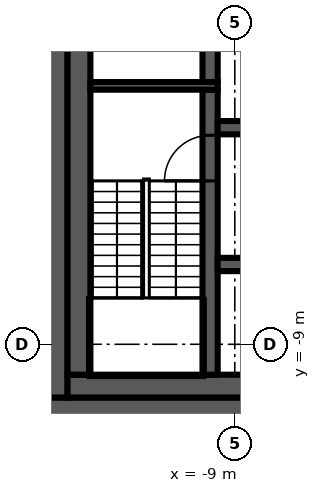
"""IFC4 building model, lengths in metres.
Left out: names, types, materials, properties, quantities, classifications, styles, units other than length and angle.
Written with IfcOpenShell. Run it as: python <this file> out.ifc"""

import sys

from ifc_helpers import new_model, si_unit, direction, frame, frame_2d, origin, place, context, subcontext, project, spatial, rectangle, extrude, element, fill, save


model = new_model("IFC4")
c1 = context("Model", 3, precision=1e-05, world=origin(), true_north=direction((0.0, 1.0)))
c2 = subcontext(c1, "Body", "Model", "MODEL_VIEW")
j1 = project(units=[si_unit("LENGTHUNIT", "METRE"), si_unit("PLANEANGLEUNIT", "RADIAN")], contexts=[c1])
p1 = place(None, origin())
s1 = spatial("IfcSite", under=j1, at=p1, CompositionType="ELEMENT")
p2 = place(p1, origin())
s2 = spatial("IfcBuilding", under=s1, at=p2, CompositionType="ELEMENT")
p3 = place(p2, frame((0.0, 0.0, 332.0)))
s3 = spatial("IfcBuildingStorey", under=s2, at=p3, CompositionType="ELEMENT", Elevation=332.0)
p4 = place(p3, frame((14.0, -10.7, 0.0), z_axis=(0.0, 0.0, 1.0), x_axis=(-1.0, 0.0, 0.0)))
e1 = element("IfcWall", 1, at=p4, inside=s3, PredefinedType="SHEAR", context=c2, shape_type="SweptSolid", body=[
    extrude(rectangle(XDim=28.0, YDim=0.6, at=frame_2d((14.0, 0.0))), origin(), (0.0, 0.0, 1.0), 3.82),
])
p5 = place(p4, frame((5.1, 0.0, 0.0)))
e2 = element("IfcOpeningElement", 2, at=p5, cuts=e1, PredefinedType="OPENING", context=c2, shape_type="SweptSolid", body=[
    extrude(rectangle(XDim=1.6, YDim=2.1, at=frame_2d((0.8, 1.05))), frame((0.0, 0.31, 0.0), z_axis=(0.0, -1.0, 0.0), x_axis=(1.0, 0.0, 0.0)), (0.0, 0.0, 1.0), 0.62),
])
p6 = place(p3, frame((-13.7, -10.4, 0.0), z_axis=(0.0, 0.0, 1.0), x_axis=(0.0, 1.0, 0.0)))
e3 = element("IfcWall", 3, at=p6, inside=s3, PredefinedType="SHEAR", context=c2, shape_type="SweptSolid", body=[
    extrude(rectangle(XDim=20.8, YDim=0.6, at=frame_2d((10.4, 0.0))), origin(), (0.0, 0.0, 1.0), 3.82),
])
p7 = place(p3, frame((6.9, -10.1, 0.0), z_axis=(0.0, 0.0, 1.0), x_axis=(-1.0, 0.0, 0.0)))
e4 = element("IfcWall", 4, at=p7, inside=s3, PredefinedType="SHEAR", context=c2, shape_type="SweptSolid", body=[
    extrude(rectangle(XDim=20.3, YDim=0.6, at=frame_2d((10.15, 0.0))), origin(), (0.0, 0.0, 1.0), 3.82),
])
p8 = place(p3, frame((-13.1, -9.8, 0.0), z_axis=(0.0, 0.0, 1.0), x_axis=(0.0, 1.0, 0.0)))
e5 = element("IfcWall", 5, at=p8, inside=s3, PredefinedType="SHEAR", context=c2, shape_type="SweptSolid", body=[
    extrude(rectangle(XDim=19.6, YDim=0.6, at=frame_2d((9.8, 0.0))), origin(), (0.0, 0.0, 1.0), 3.82),
])
p9 = place(p3, frame((-9.65, -9.8, 0.0), z_axis=(0.0, 0.0, 1.0), x_axis=(0.0, 1.0, 0.0)))
e6 = element("IfcWall", 6, at=p9, inside=s3, PredefinedType="SHEAR", context=c2, shape_type="SweptSolid", body=[
    extrude(rectangle(XDim=7.5, YDim=0.4, at=frame_2d((3.75, 0.0))), origin(), (0.0, 0.0, 1.0), 3.82),
])
p10 = place(p9, frame((5.1, 0.0, 0.0)))
e7 = element("IfcOpeningElement", 7, at=p10, cuts=e6, PredefinedType="OPENING", context=c2, shape_type="SweptSolid", body=[
    extrude(rectangle(XDim=1.2, YDim=2.1, at=frame_2d((0.6, 1.05))), frame((0.0, 0.21, 0.0), z_axis=(0.0, -1.0, 0.0), x_axis=(1.0, 0.0, 0.0)), (0.0, 0.0, 1.0), 0.42),
])
p11 = place(p3, frame((-9.65, -2.1, 0.0), z_axis=(0.0, 0.0, 1.0), x_axis=(0.0, 1.0, 0.0)))
e8 = element("IfcWall", 8, at=p11, inside=s3, PredefinedType="SHEAR", context=c2, shape_type="SweptSolid", body=[
    extrude(rectangle(XDim=4.2, YDim=0.4, at=frame_2d((2.1, 0.0))), origin(), (0.0, 0.0, 1.0), 3.82),
])
p12 = place(p3, frame((-9.45, -2.2, 0.0), z_axis=(0.0, 0.0, 1.0), x_axis=(-1.0, 0.0, 0.0)))
e9 = element("IfcWall", 9, at=p12, inside=s3, PredefinedType="SHEAR", context=c2, shape_type="SweptSolid", body=[
    extrude(rectangle(XDim=3.35, YDim=0.2, at=frame_2d((1.675, 0.0))), origin(), (0.0, 0.0, 1.0), 3.82),
])
p13 = place(p3, frame((-9.45, -3.3, 0.0), z_axis=(0.0, 0.0, 1.0), x_axis=(1.0, 0.0, 0.0)))
e10 = element("IfcWall", 10, at=p13, inside=s3, PredefinedType="SHEAR", context=c2, shape_type="SweptSolid", body=[
    extrude(rectangle(XDim=18.9, YDim=0.35, at=frame_2d((9.45, 0.0))), origin(), (0.0, 0.0, 1.0), 3.82),
])
p14 = place(p13, frame((17.0, 0.0, 0.0)))
e11 = element("IfcOpeningElement", 11, at=p14, cuts=e10, PredefinedType="OPENING", context=c2, shape_type="SweptSolid", body=[
    extrude(rectangle(XDim=1.1, YDim=2.1, at=frame_2d((0.55, 1.05))), frame((0.0, 0.185, 0.0), z_axis=(0.0, -1.0, 0.0), x_axis=(1.0, 0.0, 0.0)), (0.0, 0.0, 1.0), 0.37),
])
p15 = place(p13, frame((0.9, 0.0, 0.0)))
e12 = element("IfcOpeningElement", 12, at=p15, cuts=e10, PredefinedType="OPENING", context=c2, shape_type="SweptSolid", body=[
    extrude(rectangle(XDim=0.9, YDim=2.1, at=frame_2d((0.45, 1.05))), frame((0.0, 0.185, 0.0), z_axis=(0.0, -1.0, 0.0), x_axis=(1.0, 0.0, 0.0)), (0.0, 0.0, 1.0), 0.37),
])
p16 = place(p13, frame((4.95, 0.0, 0.0)))
e13 = element("IfcOpeningElement", 13, at=p16, cuts=e10, PredefinedType="OPENING", context=c2, shape_type="SweptSolid", body=[
    extrude(rectangle(XDim=0.9, YDim=2.1, at=frame_2d((0.45, 1.05))), frame((0.0, 0.185, 0.0), z_axis=(0.0, -1.0, 0.0), x_axis=(1.0, 0.0, 0.0)), (0.0, 0.0, 1.0), 0.37),
])
p17 = place(p13, frame((9.0, 0.0, 0.0)))
e14 = element("IfcOpeningElement", 14, at=p17, cuts=e10, PredefinedType="OPENING", context=c2, shape_type="SweptSolid", body=[
    extrude(rectangle(XDim=0.9, YDim=2.1, at=frame_2d((0.45, 1.05))), frame((0.0, 0.185, 0.0), z_axis=(0.0, -1.0, 0.0), x_axis=(1.0, 0.0, 0.0)), (0.0, 0.0, 1.0), 0.37),
])
p18 = place(p13, frame((13.05, 0.0, 0.0)))
e15 = element("IfcOpeningElement", 15, at=p18, cuts=e10, PredefinedType="OPENING", context=c2, shape_type="SweptSolid", body=[
    extrude(rectangle(XDim=0.9, YDim=2.1, at=frame_2d((0.45, 1.05))), frame((0.0, 0.185, 0.0), z_axis=(0.0, -1.0, 0.0), x_axis=(1.0, 0.0, 0.0)), (0.0, 0.0, 1.0), 0.37),
])
p19 = place(p3, frame((9.45, -6.9, 0.0), z_axis=(0.0, 0.0, 1.0), x_axis=(-1.0, 0.0, 0.0)))
e16 = element("IfcWall", 16, at=p19, inside=s3, PredefinedType="SHEAR", context=c2, shape_type="SweptSolid", body=[
    extrude(rectangle(XDim=18.9, YDim=0.35, at=frame_2d((9.45, 0.0))), origin(), (0.0, 0.0, 1.0), 3.82),
])
p20 = place(p19, frame((17.0, 0.0, 0.0)))
e17 = element("IfcOpeningElement", 17, at=p20, cuts=e16, PredefinedType="OPENING", context=c2, shape_type="SweptSolid", body=[
    extrude(rectangle(XDim=1.1, YDim=2.1, at=frame_2d((0.55, 1.05))), frame((0.0, 0.185, 0.0), z_axis=(0.0, -1.0, 0.0), x_axis=(1.0, 0.0, 0.0)), (0.0, 0.0, 1.0), 0.37),
])
p21 = place(p19, frame((14.3, 0.0, 0.0)))
e18 = element("IfcOpeningElement", 18, at=p21, cuts=e16, PredefinedType="OPENING", context=c2, shape_type="SweptSolid", body=[
    extrude(rectangle(XDim=1.1, YDim=2.1, at=frame_2d((0.55, 1.05))), frame((0.0, 0.185, 0.0), z_axis=(0.0, -1.0, 0.0), x_axis=(1.0, 0.0, 0.0)), (0.0, 0.0, 1.0), 0.37),
])
p22 = place(p19, frame((11.6, 0.0, 0.0)))
e19 = element("IfcOpeningElement", 19, at=p22, cuts=e16, PredefinedType="OPENING", context=c2, shape_type="SweptSolid", body=[
    extrude(rectangle(XDim=1.1, YDim=2.1, at=frame_2d((0.55, 1.05))), frame((0.0, 0.185, 0.0), z_axis=(0.0, -1.0, 0.0), x_axis=(1.0, 0.0, 0.0)), (0.0, 0.0, 1.0), 0.37),
])
p23 = place(p19, frame((8.9, 0.0, 0.0)))
e20 = element("IfcOpeningElement", 20, at=p23, cuts=e16, PredefinedType="OPENING", context=c2, shape_type="SweptSolid", body=[
    extrude(rectangle(XDim=1.1, YDim=2.1, at=frame_2d((0.55, 1.05))), frame((0.0, 0.185, 0.0), z_axis=(0.0, -1.0, 0.0), x_axis=(1.0, 0.0, 0.0)), (0.0, 0.0, 1.0), 0.37),
])
p24 = place(p19, frame((0.75, 0.0, 0.0)))
e21 = element("IfcOpeningElement", 21, at=p24, cuts=e16, PredefinedType="OPENING", context=c2, shape_type="SweptSolid", body=[
    extrude(rectangle(XDim=1.2, YDim=2.1, at=frame_2d((0.6, 1.05))), frame((0.0, 0.185, 0.0), z_axis=(0.0, -1.0, 0.0), x_axis=(1.0, 0.0, 0.0)), (0.0, 0.0, 1.0), 0.37),
])
p25 = place(p19, frame((6.3, 0.0, 0.0)))
e22 = element("IfcOpeningElement", 22, at=p25, cuts=e16, PredefinedType="OPENING", context=c2, shape_type="SweptSolid", body=[
    extrude(rectangle(XDim=0.9, YDim=2.1, at=frame_2d((0.45, 1.05))), frame((0.0, 0.185, 0.0), z_axis=(0.0, -1.0, 0.0), x_axis=(1.0, 0.0, 0.0)), (0.0, 0.0, 1.0), 0.37),
])
p26 = place(p19, frame((3.6, 0.0, 0.0)))
e23 = element("IfcOpeningElement", 23, at=p26, cuts=e16, PredefinedType="OPENING", context=c2, shape_type="SweptSolid", body=[
    extrude(rectangle(XDim=0.9, YDim=2.1, at=frame_2d((0.45, 1.05))), frame((0.0, 0.185, 0.0), z_axis=(0.0, -1.0, 0.0), x_axis=(1.0, 0.0, 0.0)), (0.0, 0.0, 1.0), 0.37),
])
p27 = place(p10, origin())
e24 = element("IfcDoor", 24, at=p27, inside=s3, OperationType="SINGLE_SWING_LEFT", PredefinedType="DOOR", context=c2, shape_type="SweptSolid", body=[
    extrude(rectangle(XDim=1.2, YDim=2.1, at=frame_2d((0.6, 1.05))), frame((0.0, 0.025, 0.0), z_axis=(0.0, -1.0, 0.0), x_axis=(1.0, 0.0, 0.0)), (0.0, 0.0, 1.0), 0.05),
])
fill(e7, e24)
save(model, sys.argv[1])
